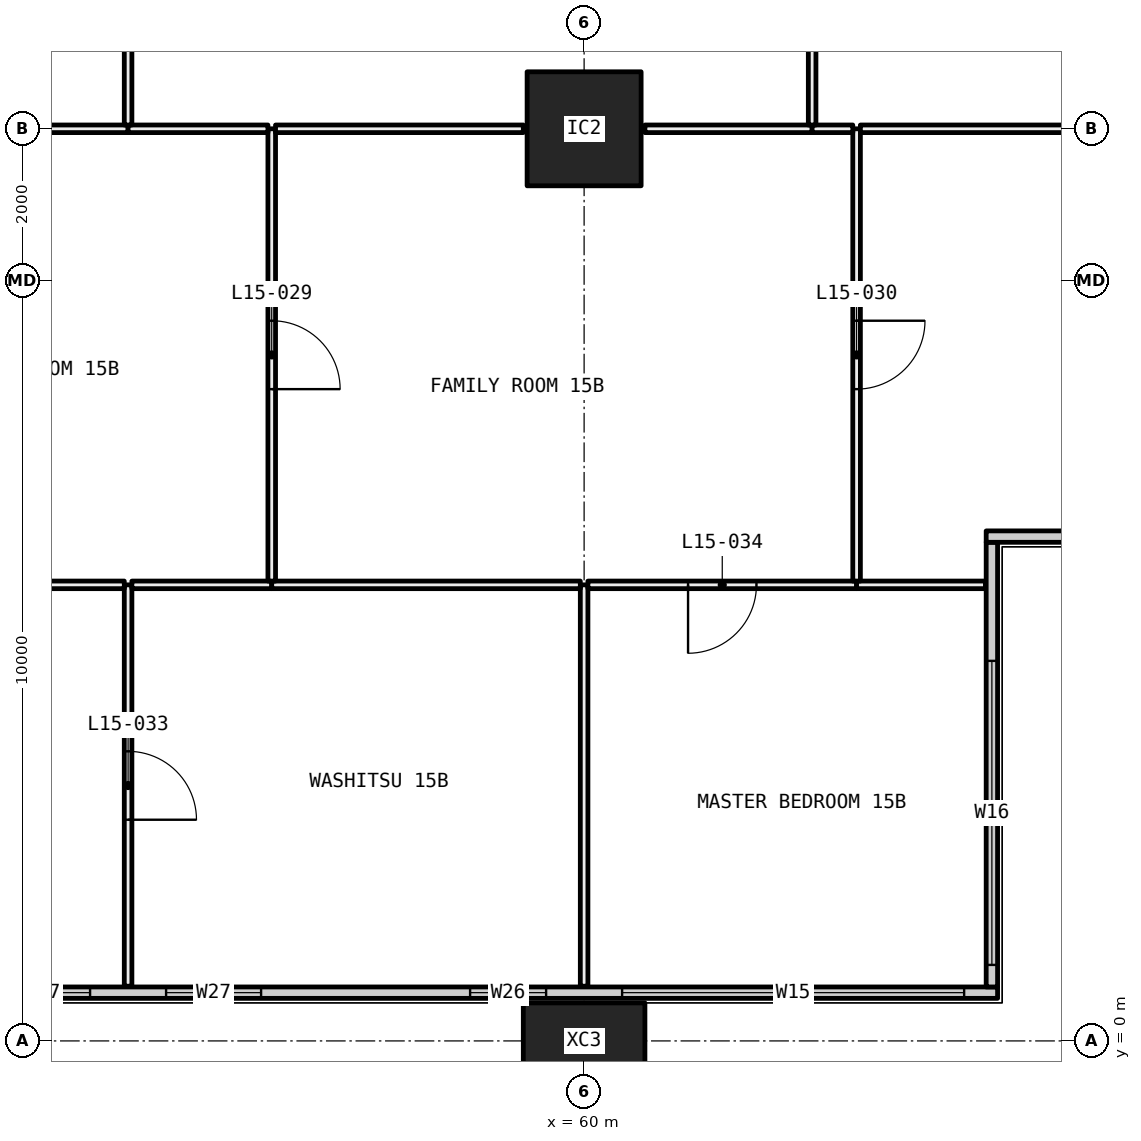
"""IFC4 building model, lengths in metres.
Left out: names, types, materials, properties, quantities, classifications, styles, units other than length and angle.
Written with IfcOpenShell. Run it as: python <this file> out.ifc"""

import sys

from ifc_helpers import new_model, si_unit, direction, frame, frame_2d, origin, origin_2d, place, context, subcontext, project, spatial, rectangle, hollow_rectangle, extrude, element, fill, save


model = new_model("IFC4")
c1 = context("Model", 3, precision=1e-05, world=origin(), true_north=direction((0.0, 1.0)))
c2 = subcontext(c1, "Body", "Model", "MODEL_VIEW")
j1 = project(units=[si_unit("LENGTHUNIT", "METRE"), si_unit("PLANEANGLEUNIT", "RADIAN")], contexts=[c1])
p1 = place(None, origin())
s1 = spatial("IfcSite", under=j1, at=p1, CompositionType="ELEMENT")
p2 = place(p1, origin())
s2 = spatial("IfcBuilding", under=s1, at=p2, CompositionType="ELEMENT")
p3 = place(p2, frame((0.0, 0.0, 64.5)))
s3 = spatial("IfcBuildingStorey", under=s2, at=p3, CompositionType="ELEMENT", Elevation=64.5)
p4 = place(p3, frame((60.0, 0.0, -0.4), z_axis=(0.0, 0.0, 1.0), x_axis=(1.0, 0.0, 0.0)))
e1 = element("IfcColumn", 1, at=p4, inside=s3, PredefinedType="COLUMN", context=c2, shape_type="SweptSolid", body=[
    extrude(hollow_rectangle(XDim=1.6, YDim=1.0, WallThickness=0.065, at=origin_2d()), origin(), (0.0, 0.0, 1.0), 3.45),
])
p5 = place(p3, frame((60.0, 12.0, 0.0), z_axis=(0.0, 0.0, 1.0), x_axis=(1.0, 0.0, 0.0)))
e2 = element("IfcColumn", 2, at=p5, inside=s3, PredefinedType="COLUMN", context=c2, shape_type="SweptSolid", body=[
    extrude(hollow_rectangle(XDim=1.5, YDim=1.5, WallThickness=0.065, at=origin_2d()), origin(), (0.0, 0.0, 1.0), 3.05),
])
p6 = place(p3, frame((6.56, 0.635, 0.0), z_axis=(0.0, 0.0, 1.0), x_axis=(1.0, 0.0, 0.0)))
e3 = element("IfcWall", 3, at=p6, inside=s3, PredefinedType="ELEMENTEDWALL", context=c2, shape_type="SweptSolid", body=[
    extrude(rectangle(XDim=58.88, YDim=0.15, at=frame_2d((29.44, 0.0))), origin(), (0.0, 0.0, 1.0), 3.05),
])
p7 = place(p6, frame((0.44, 0.0, 0.45)))
e4 = element("IfcOpeningElement", 4, at=p7, cuts=e3, PredefinedType="OPENING", context=c2, shape_type="SweptSolid", body=[
    extrude(rectangle(XDim=4.5, YDim=2.55, at=frame_2d((2.25, 1.275))), frame((0.0, 0.085, 0.0), z_axis=(0.0, -1.0, 0.0), x_axis=(1.0, 0.0, 0.0)), (0.0, 0.0, 1.0), 0.17),
])
p8 = place(p6, frame((5.94, 0.0, 0.45)))
e5 = element("IfcOpeningElement", 5, at=p8, cuts=e3, PredefinedType="OPENING", context=c2, shape_type="SweptSolid", body=[
    extrude(rectangle(XDim=1.0, YDim=2.55, at=frame_2d((0.5, 1.275))), frame((0.0, 0.085, 0.0), z_axis=(0.0, -1.0, 0.0), x_axis=(1.0, 0.0, 0.0)), (0.0, 0.0, 1.0), 0.17),
])
p9 = place(p6, frame((9.69, 0.0, 0.45)))
e6 = element("IfcOpeningElement", 6, at=p9, cuts=e3, PredefinedType="OPENING", context=c2, shape_type="SweptSolid", body=[
    extrude(rectangle(XDim=1.25, YDim=2.55, at=frame_2d((0.625, 1.275))), frame((0.0, 0.085, 0.0), z_axis=(0.0, -1.0, 0.0), x_axis=(1.0, 0.0, 0.0)), (0.0, 0.0, 1.0), 0.17),
])
p10 = place(p6, frame((11.94, 0.0, 0.45)))
e7 = element("IfcOpeningElement", 7, at=p10, cuts=e3, PredefinedType="OPENING", context=c2, shape_type="SweptSolid", body=[
    extrude(rectangle(XDim=1.25, YDim=2.55, at=frame_2d((0.625, 1.275))), frame((0.0, 0.085, 0.0), z_axis=(0.0, -1.0, 0.0), x_axis=(1.0, 0.0, 0.0)), (0.0, 0.0, 1.0), 0.17),
])
p11 = place(p6, frame((15.94, 0.0, 0.45)))
e8 = element("IfcOpeningElement", 8, at=p11, cuts=e3, PredefinedType="OPENING", context=c2, shape_type="SweptSolid", body=[
    extrude(rectangle(XDim=1.0, YDim=2.55, at=frame_2d((0.5, 1.275))), frame((0.0, 0.085, 0.0), z_axis=(0.0, -1.0, 0.0), x_axis=(1.0, 0.0, 0.0)), (0.0, 0.0, 1.0), 0.17),
])
p12 = place(p6, frame((17.94, 0.0, 0.45)))
e9 = element("IfcOpeningElement", 9, at=p12, cuts=e3, PredefinedType="OPENING", context=c2, shape_type="SweptSolid", body=[
    extrude(rectangle(XDim=1.0, YDim=2.55, at=frame_2d((0.5, 1.275))), frame((0.0, 0.085, 0.0), z_axis=(0.0, -1.0, 0.0), x_axis=(1.0, 0.0, 0.0)), (0.0, 0.0, 1.0), 0.17),
])
p13 = place(p6, frame((21.69, 0.0, 0.45)))
e10 = element("IfcOpeningElement", 10, at=p13, cuts=e3, PredefinedType="OPENING", context=c2, shape_type="SweptSolid", body=[
    extrude(rectangle(XDim=1.25, YDim=2.55, at=frame_2d((0.625, 1.275))), frame((0.0, 0.085, 0.0), z_axis=(0.0, -1.0, 0.0), x_axis=(1.0, 0.0, 0.0)), (0.0, 0.0, 1.0), 0.17),
])
p14 = place(p6, frame((23.94, 0.0, 0.45)))
e11 = element("IfcOpeningElement", 11, at=p14, cuts=e3, PredefinedType="OPENING", context=c2, shape_type="SweptSolid", body=[
    extrude(rectangle(XDim=1.25, YDim=2.55, at=frame_2d((0.625, 1.275))), frame((0.0, 0.085, 0.0), z_axis=(0.0, -1.0, 0.0), x_axis=(1.0, 0.0, 0.0)), (0.0, 0.0, 1.0), 0.17),
])
p15 = place(p6, frame((27.94, 0.0, 0.45)))
e12 = element("IfcOpeningElement", 12, at=p15, cuts=e3, PredefinedType="OPENING", context=c2, shape_type="SweptSolid", body=[
    extrude(rectangle(XDim=1.0, YDim=2.55, at=frame_2d((0.5, 1.275))), frame((0.0, 0.085, 0.0), z_axis=(0.0, -1.0, 0.0), x_axis=(1.0, 0.0, 0.0)), (0.0, 0.0, 1.0), 0.17),
])
p16 = place(p6, frame((29.94, 0.0, 0.45)))
e13 = element("IfcOpeningElement", 13, at=p16, cuts=e3, PredefinedType="OPENING", context=c2, shape_type="SweptSolid", body=[
    extrude(rectangle(XDim=1.0, YDim=2.55, at=frame_2d((0.5, 1.275))), frame((0.0, 0.085, 0.0), z_axis=(0.0, -1.0, 0.0), x_axis=(1.0, 0.0, 0.0)), (0.0, 0.0, 1.0), 0.17),
])
p17 = place(p6, frame((33.69, 0.0, 0.45)))
e14 = element("IfcOpeningElement", 14, at=p17, cuts=e3, PredefinedType="OPENING", context=c2, shape_type="SweptSolid", body=[
    extrude(rectangle(XDim=1.25, YDim=2.55, at=frame_2d((0.625, 1.275))), frame((0.0, 0.085, 0.0), z_axis=(0.0, -1.0, 0.0), x_axis=(1.0, 0.0, 0.0)), (0.0, 0.0, 1.0), 0.17),
])
p18 = place(p6, frame((35.94, 0.0, 0.45)))
e15 = element("IfcOpeningElement", 15, at=p18, cuts=e3, PredefinedType="OPENING", context=c2, shape_type="SweptSolid", body=[
    extrude(rectangle(XDim=1.25, YDim=2.55, at=frame_2d((0.625, 1.275))), frame((0.0, 0.085, 0.0), z_axis=(0.0, -1.0, 0.0), x_axis=(1.0, 0.0, 0.0)), (0.0, 0.0, 1.0), 0.17),
])
p19 = place(p6, frame((39.94, 0.0, 0.45)))
e16 = element("IfcOpeningElement", 16, at=p19, cuts=e3, PredefinedType="OPENING", context=c2, shape_type="SweptSolid", body=[
    extrude(rectangle(XDim=1.0, YDim=2.55, at=frame_2d((0.5, 1.275))), frame((0.0, 0.085, 0.0), z_axis=(0.0, -1.0, 0.0), x_axis=(1.0, 0.0, 0.0)), (0.0, 0.0, 1.0), 0.17),
])
p20 = place(p6, frame((41.94, 0.0, 0.45)))
e17 = element("IfcOpeningElement", 17, at=p20, cuts=e3, PredefinedType="OPENING", context=c2, shape_type="SweptSolid", body=[
    extrude(rectangle(XDim=1.0, YDim=2.55, at=frame_2d((0.5, 1.275))), frame((0.0, 0.085, 0.0), z_axis=(0.0, -1.0, 0.0), x_axis=(1.0, 0.0, 0.0)), (0.0, 0.0, 1.0), 0.17),
])
p21 = place(p6, frame((45.69, 0.0, 0.45)))
e18 = element("IfcOpeningElement", 18, at=p21, cuts=e3, PredefinedType="OPENING", context=c2, shape_type="SweptSolid", body=[
    extrude(rectangle(XDim=1.25, YDim=2.55, at=frame_2d((0.625, 1.275))), frame((0.0, 0.085, 0.0), z_axis=(0.0, -1.0, 0.0), x_axis=(1.0, 0.0, 0.0)), (0.0, 0.0, 1.0), 0.17),
])
p22 = place(p6, frame((47.94, 0.0, 0.45)))
e19 = element("IfcOpeningElement", 19, at=p22, cuts=e3, PredefinedType="OPENING", context=c2, shape_type="SweptSolid", body=[
    extrude(rectangle(XDim=1.25, YDim=2.55, at=frame_2d((0.625, 1.275))), frame((0.0, 0.085, 0.0), z_axis=(0.0, -1.0, 0.0), x_axis=(1.0, 0.0, 0.0)), (0.0, 0.0, 1.0), 0.17),
])
p23 = place(p6, frame((51.94, 0.0, 0.45)))
e20 = element("IfcOpeningElement", 20, at=p23, cuts=e3, PredefinedType="OPENING", context=c2, shape_type="SweptSolid", body=[
    extrude(rectangle(XDim=1.0, YDim=2.55, at=frame_2d((0.5, 1.275))), frame((0.0, 0.085, 0.0), z_axis=(0.0, -1.0, 0.0), x_axis=(1.0, 0.0, 0.0)), (0.0, 0.0, 1.0), 0.17),
])
p24 = place(p6, frame((53.94, 0.0, 0.45)))
e21 = element("IfcOpeningElement", 21, at=p24, cuts=e3, PredefinedType="OPENING", context=c2, shape_type="SweptSolid", body=[
    extrude(rectangle(XDim=4.5, YDim=2.55, at=frame_2d((2.25, 1.275))), frame((0.0, 0.085, 0.0), z_axis=(0.0, -1.0, 0.0), x_axis=(1.0, 0.0, 0.0)), (0.0, 0.0, 1.0), 0.17),
])
p25 = place(p3, frame((65.365, 0.71, 0.0), z_axis=(0.0, 0.0, 1.0), x_axis=(0.0, 1.0, 0.0)))
e22 = element("IfcWall", 22, at=p25, inside=s3, PredefinedType="ELEMENTEDWALL", context=c2, shape_type="SweptSolid", body=[
    extrude(rectangle(XDim=5.85, YDim=0.15, at=frame_2d((2.925, 0.0))), origin(), (0.0, 0.0, 1.0), 3.05),
])
p26 = place(p25, frame((0.29, 0.0, 0.45)))
e23 = element("IfcOpeningElement", 23, at=p26, cuts=e22, PredefinedType="OPENING", context=c2, shape_type="SweptSolid", body=[
    extrude(rectangle(XDim=4.0, YDim=2.55, at=frame_2d((2.0, 1.275))), frame((0.0, 0.085, 0.0), z_axis=(0.0, -1.0, 0.0), x_axis=(1.0, 0.0, 0.0)), (0.0, 0.0, 1.0), 0.17),
])
p27 = place(p3, frame((65.29, 6.635, 0.0), z_axis=(0.0, 0.0, 1.0), x_axis=(1.0, 0.0, 0.0)))
e24 = element("IfcWall", 24, at=p27, inside=s3, PredefinedType="ELEMENTEDWALL", context=c2, shape_type="SweptSolid", body=[
    extrude(rectangle(XDim=6.15, YDim=0.15, at=frame_2d((3.075, 0.0))), origin(), (0.0, 0.0, 1.0), 3.05),
])
p28 = place(p27, frame((1.71, 0.0, 0.45)))
e25 = element("IfcOpeningElement", 25, at=p28, cuts=e24, PredefinedType="OPENING", context=c2, shape_type="SweptSolid", body=[
    extrude(rectangle(XDim=4.0, YDim=2.55, at=frame_2d((2.0, 1.275))), frame((0.0, 0.085, 0.0), z_axis=(0.0, -1.0, 0.0), x_axis=(1.0, 0.0, 0.0)), (0.0, 0.0, 1.0), 0.17),
])
p29 = place(p3, frame((54.0, 0.72, 0.0), z_axis=(0.0, 0.0, 1.0), x_axis=(0.0, 1.0, 0.0)))
e26 = element("IfcWall", 26, at=p29, inside=s3, PredefinedType="PARTITIONING", context=c2, shape_type="SweptSolid", body=[
    extrude(rectangle(XDim=5.28, YDim=0.1, at=frame_2d((2.64, 0.0))), origin(), (0.0, 0.0, 1.0), 3.05),
])
p30 = place(p29, frame((2.19, 0.0, 0.0)))
e27 = element("IfcOpeningElement", 27, at=p30, cuts=e26, PredefinedType="OPENING", context=c2, shape_type="SweptSolid", body=[
    extrude(rectangle(XDim=0.9, YDim=2.1, at=frame_2d((0.45, 1.05))), frame((0.0, 0.06, 0.0), z_axis=(0.0, -1.0, 0.0), x_axis=(1.0, 0.0, 0.0)), (0.0, 0.0, 1.0), 0.12),
])
p31 = place(p3, frame((53.95, 6.0, 0.0), z_axis=(0.0, 0.0, 1.0), x_axis=(-1.0, 0.0, 0.0)))
e28 = element("IfcWall", 28, at=p31, inside=s3, PredefinedType="PARTITIONING", context=c2, shape_type="SweptSolid", body=[
    extrude(rectangle(XDim=5.755, YDim=0.1, at=frame_2d((2.877, 0.0))), origin(), (0.0, 0.0, 1.0), 3.05),
])
p32 = place(p31, frame((2.427, 0.0, 0.0)))
e29 = element("IfcOpeningElement", 29, at=p32, cuts=e28, PredefinedType="OPENING", context=c2, shape_type="SweptSolid", body=[
    extrude(rectangle(XDim=0.9, YDim=2.1, at=frame_2d((0.45, 1.05))), frame((0.0, 0.06, 0.0), z_axis=(0.0, -1.0, 0.0), x_axis=(1.0, 0.0, 0.0)), (0.0, 0.0, 1.0), 0.12),
])
p33 = place(p3, frame((60.0, 0.72, 0.0), z_axis=(0.0, 0.0, 1.0), x_axis=(0.0, 1.0, 0.0)))
e30 = element("IfcWall", 30, at=p33, inside=s3, PredefinedType="PARTITIONING", context=c2, shape_type="SweptSolid", body=[
    extrude(rectangle(XDim=5.28, YDim=0.1, at=frame_2d((2.64, 0.0))), origin(), (0.0, 0.0, 1.0), 2.45),
])
p34 = place(p3, frame((55.89, 6.0, 0.0), z_axis=(0.0, 0.0, 1.0), x_axis=(-1.0, 0.0, 0.0)))
e31 = element("IfcWall", 31, at=p34, inside=s3, PredefinedType="PARTITIONING", context=c2, shape_type="SweptSolid", body=[
    extrude(rectangle(XDim=1.84, YDim=0.1, at=frame_2d((0.92, 0.0))), origin(), (0.0, 0.0, 1.0), 3.05),
])
p35 = place(p3, frame((59.95, 6.0, 0.0), z_axis=(0.0, 0.0, 1.0), x_axis=(-1.0, 0.0, 0.0)))
e32 = element("IfcWall", 32, at=p35, inside=s3, PredefinedType="PARTITIONING", context=c2, shape_type="SweptSolid", body=[
    extrude(rectangle(XDim=4.06, YDim=0.1, at=frame_2d((2.03, 0.0))), origin(), (0.0, 0.0, 1.0), 2.45),
])
p36 = place(p3, frame((63.585, 6.0, 0.0), z_axis=(0.0, 0.0, 1.0), x_axis=(-1.0, 0.0, 0.0)))
e33 = element("IfcWall", 33, at=p36, inside=s3, PredefinedType="PARTITIONING", context=c2, shape_type="SweptSolid", body=[
    extrude(rectangle(XDim=3.535, YDim=0.1, at=frame_2d((1.768, 0.0))), origin(), (0.0, 0.0, 1.0), 2.45),
])
p37 = place(p36, frame((1.317, 0.0, 0.0)))
e34 = element("IfcOpeningElement", 34, at=p37, cuts=e33, PredefinedType="OPENING", context=c2, shape_type="SweptSolid", body=[
    extrude(rectangle(XDim=0.9, YDim=2.1, at=frame_2d((0.45, 1.05))), frame((0.0, 0.06, 0.0), z_axis=(0.0, -1.0, 0.0), x_axis=(1.0, 0.0, 0.0)), (0.0, 0.0, 1.0), 0.12),
])
p38 = place(p3, frame((65.28, 6.0, 0.0), z_axis=(0.0, 0.0, 1.0), x_axis=(-1.0, 0.0, 0.0)))
e35 = element("IfcWall", 35, at=p38, inside=s3, PredefinedType="PARTITIONING", context=c2, shape_type="SweptSolid", body=[
    extrude(rectangle(XDim=1.695, YDim=0.1, at=frame_2d((0.848, 0.0))), origin(), (0.0, 0.0, 1.0), 3.05),
])
p39 = place(p3, frame((55.89, 6.05, 0.0), z_axis=(0.0, 0.0, 1.0), x_axis=(0.0, 1.0, 0.0)))
e36 = element("IfcWall", 36, at=p39, inside=s3, PredefinedType="PARTITIONING", context=c2, shape_type="SweptSolid", body=[
    extrude(rectangle(XDim=5.95, YDim=0.1, at=frame_2d((2.975, 0.0))), origin(), (0.0, 0.0, 1.0), 2.45),
])
p40 = place(p39, frame((2.525, 0.0, 0.0)))
e37 = element("IfcOpeningElement", 37, at=p40, cuts=e36, PredefinedType="OPENING", context=c2, shape_type="SweptSolid", body=[
    extrude(rectangle(XDim=0.9, YDim=2.1, at=frame_2d((0.45, 1.05))), frame((0.0, 0.06, 0.0), z_axis=(0.0, -1.0, 0.0), x_axis=(1.0, 0.0, 0.0)), (0.0, 0.0, 1.0), 0.12),
])
p41 = place(p3, frame((54.0, 12.0, 0.0), z_axis=(0.0, 0.0, 1.0), x_axis=(-1.0, 0.0, 0.0)))
e38 = element("IfcWall", 38, at=p41, inside=s3, PredefinedType="PARTITIONING", context=c2, shape_type="SweptSolid", body=[
    extrude(rectangle(XDim=4.5, YDim=0.1, at=frame_2d((2.25, 0.0))), origin(), (0.0, 0.0, 1.0), 2.45),
])
p42 = place(p41, frame((1.8, 0.0, 0.0)))
e39 = element("IfcOpeningElement", 39, at=p42, cuts=e38, PredefinedType="OPENING", context=c2, shape_type="SweptSolid", body=[
    extrude(rectangle(XDim=0.9, YDim=2.1, at=frame_2d((0.45, 1.05))), frame((0.0, 0.06, 0.0), z_axis=(0.0, -1.0, 0.0), x_axis=(1.0, 0.0, 0.0)), (0.0, 0.0, 1.0), 0.12),
])
p43 = place(p3, frame((55.84, 12.0, 0.0), z_axis=(0.0, 0.0, 1.0), x_axis=(-1.0, 0.0, 0.0)))
e40 = element("IfcWall", 40, at=p43, inside=s3, PredefinedType="PARTITIONING", context=c2, shape_type="SweptSolid", body=[
    extrude(rectangle(XDim=1.84, YDim=0.1, at=frame_2d((0.92, 0.0))), origin(), (0.0, 0.0, 1.0), 2.45),
])
p44 = place(p3, frame((63.585, 6.05, 0.0), z_axis=(0.0, 0.0, 1.0), x_axis=(0.0, 1.0, 0.0)))
e41 = element("IfcWall", 41, at=p44, inside=s3, PredefinedType="PARTITIONING", context=c2, shape_type="SweptSolid", body=[
    extrude(rectangle(XDim=5.95, YDim=0.1, at=frame_2d((2.975, 0.0))), origin(), (0.0, 0.0, 1.0), 2.45),
])
p45 = place(p44, frame((2.525, 0.0, 0.0)))
e42 = element("IfcOpeningElement", 42, at=p45, cuts=e41, PredefinedType="OPENING", context=c2, shape_type="SweptSolid", body=[
    extrude(rectangle(XDim=0.9, YDim=2.1, at=frame_2d((0.45, 1.05))), frame((0.0, 0.06, 0.0), z_axis=(0.0, -1.0, 0.0), x_axis=(1.0, 0.0, 0.0)), (0.0, 0.0, 1.0), 0.12),
])
p46 = place(p3, frame((59.2, 12.0, 0.0), z_axis=(0.0, 0.0, 1.0), x_axis=(-1.0, 0.0, 0.0)))
e43 = element("IfcWall", 43, at=p46, inside=s3, PredefinedType="PARTITIONING", context=c2, shape_type="SweptSolid", body=[
    extrude(rectangle(XDim=3.26, YDim=0.1, at=frame_2d((1.63, 0.0))), origin(), (0.0, 0.0, 1.0), 2.45),
])
p47 = place(p3, frame((63.0, 12.0, 0.0), z_axis=(0.0, 0.0, 1.0), x_axis=(-1.0, 0.0, 0.0)))
e44 = element("IfcWall", 44, at=p47, inside=s3, PredefinedType="PARTITIONING", context=c2, shape_type="SweptSolid", body=[
    extrude(rectangle(XDim=2.2, YDim=0.1, at=frame_2d((1.1, 0.0))), origin(), (0.0, 0.0, 1.0), 2.45),
])
p48 = place(p3, frame((63.535, 12.0, 0.0), z_axis=(0.0, 0.0, 1.0), x_axis=(-1.0, 0.0, 0.0)))
e45 = element("IfcWall", 45, at=p48, inside=s3, PredefinedType="PARTITIONING", context=c2, shape_type="SweptSolid", body=[
    extrude(rectangle(XDim=0.535, YDim=0.1, at=frame_2d((0.268, 0.0))), origin(), (0.0, 0.0, 1.0), 2.45),
])
p49 = place(p3, frame((71.28, 12.0, 0.0), z_axis=(0.0, 0.0, 1.0), x_axis=(-1.0, 0.0, 0.0)))
e46 = element("IfcWall", 46, at=p49, inside=s3, PredefinedType="PARTITIONING", context=c2, shape_type="SweptSolid", body=[
    extrude(rectangle(XDim=7.645, YDim=0.1, at=frame_2d((3.823, 0.0))), origin(), (0.0, 0.0, 1.0), 2.45),
])
p50 = place(p49, frame((3.373, 0.0, 0.0)))
e47 = element("IfcOpeningElement", 47, at=p50, cuts=e46, PredefinedType="OPENING", context=c2, shape_type="SweptSolid", body=[
    extrude(rectangle(XDim=0.9, YDim=2.1, at=frame_2d((0.45, 1.05))), frame((0.0, 0.06, 0.0), z_axis=(0.0, -1.0, 0.0), x_axis=(1.0, 0.0, 0.0)), (0.0, 0.0, 1.0), 0.12),
])
p51 = place(p3, frame((54.0, 12.05, 0.0), z_axis=(0.0, 0.0, 1.0), x_axis=(0.0, 1.0, 0.0)))
e48 = element("IfcWall", 48, at=p51, inside=s3, PredefinedType="PARTITIONING", context=c2, shape_type="SweptSolid", body=[
    extrude(rectangle(XDim=5.85, YDim=0.1, at=frame_2d((2.925, 0.0))), origin(), (0.0, 0.0, 1.0), 2.45),
])
p52 = place(p51, frame((2.475, 0.0, 0.0)))
e49 = element("IfcOpeningElement", 49, at=p52, cuts=e48, PredefinedType="OPENING", context=c2, shape_type="SweptSolid", body=[
    extrude(rectangle(XDim=0.9, YDim=2.1, at=frame_2d((0.45, 1.05))), frame((0.0, 0.06, 0.0), z_axis=(0.0, -1.0, 0.0), x_axis=(1.0, 0.0, 0.0)), (0.0, 0.0, 1.0), 0.12),
])
p53 = place(p3, frame((63.0, 12.05, 0.0), z_axis=(0.0, 0.0, 1.0), x_axis=(0.0, 1.0, 0.0)))
e50 = element("IfcWall", 50, at=p53, inside=s3, PredefinedType="PARTITIONING", context=c2, shape_type="SweptSolid", body=[
    extrude(rectangle(XDim=5.85, YDim=0.1, at=frame_2d((2.925, 0.0))), origin(), (0.0, 0.0, 1.0), 2.45),
])
p54 = place(p21, origin())
e51 = element("IfcWindow", 51, at=p54, inside=s3, PartitioningType="SINGLE_PANEL", PredefinedType="WINDOW", context=c2, shape_type="SweptSolid", body=[
    extrude(rectangle(XDim=1.25, YDim=2.55, at=frame_2d((0.625, 1.275))), frame((0.0, 0.03, 0.0), z_axis=(0.0, -1.0, 0.0), x_axis=(1.0, 0.0, 0.0)), (0.0, 0.0, 1.0), 0.06),
])
fill(e18, e51)
p55 = place(p22, origin())
e52 = element("IfcWindow", 52, at=p55, inside=s3, PartitioningType="SINGLE_PANEL", PredefinedType="WINDOW", context=c2, shape_type="SweptSolid", body=[
    extrude(rectangle(XDim=1.25, YDim=2.55, at=frame_2d((0.625, 1.275))), frame((0.0, 0.03, 0.0), z_axis=(0.0, -1.0, 0.0), x_axis=(1.0, 0.0, 0.0)), (0.0, 0.0, 1.0), 0.06),
])
fill(e19, e52)
p56 = place(p23, origin())
e53 = element("IfcWindow", 53, at=p56, inside=s3, PartitioningType="SINGLE_PANEL", PredefinedType="WINDOW", context=c2, shape_type="SweptSolid", body=[
    extrude(rectangle(XDim=1.0, YDim=2.55, at=frame_2d((0.5, 1.275))), frame((0.0, 0.03, 0.0), z_axis=(0.0, -1.0, 0.0), x_axis=(1.0, 0.0, 0.0)), (0.0, 0.0, 1.0), 0.06),
])
fill(e20, e53)
p57 = place(p24, origin())
e54 = element("IfcWindow", 54, at=p57, inside=s3, PartitioningType="SINGLE_PANEL", PredefinedType="WINDOW", context=c2, shape_type="SweptSolid", body=[
    extrude(rectangle(XDim=4.5, YDim=2.55, at=frame_2d((2.25, 1.275))), frame((0.0, 0.03, 0.0), z_axis=(0.0, -1.0, 0.0), x_axis=(1.0, 0.0, 0.0)), (0.0, 0.0, 1.0), 0.06),
])
fill(e21, e54)
p58 = place(p26, origin())
e55 = element("IfcWindow", 55, at=p58, inside=s3, PartitioningType="SINGLE_PANEL", PredefinedType="WINDOW", context=c2, shape_type="SweptSolid", body=[
    extrude(rectangle(XDim=4.0, YDim=2.55, at=frame_2d((2.0, 1.275))), frame((0.0, 0.03, 0.0), z_axis=(0.0, -1.0, 0.0), x_axis=(1.0, 0.0, 0.0)), (0.0, 0.0, 1.0), 0.06),
])
fill(e23, e55)
p59 = place(p40, frame((0.9, 0.0, 0.0), x_axis=(-1.0, 0.0, 0.0)))
e56 = element("IfcDoor", 56, at=p59, inside=s3, OperationType="SINGLE_SWING_LEFT", PredefinedType="DOOR", context=c2, shape_type="SweptSolid", body=[
    extrude(rectangle(XDim=0.9, YDim=2.1, at=frame_2d((0.45, 1.05))), frame((0.0, 0.025, 0.0), z_axis=(0.0, -1.0, 0.0), x_axis=(1.0, 0.0, 0.0)), (0.0, 0.0, 1.0), 0.05),
])
fill(e37, e56)
p60 = place(p45, frame((0.9, 0.0, 0.0), x_axis=(-1.0, 0.0, 0.0)))
e57 = element("IfcDoor", 57, at=p60, inside=s3, OperationType="SINGLE_SWING_RIGHT", PredefinedType="DOOR", context=c2, shape_type="SweptSolid", body=[
    extrude(rectangle(XDim=0.9, YDim=2.1, at=frame_2d((0.45, 1.05))), frame((0.0, 0.025, 0.0), z_axis=(0.0, -1.0, 0.0), x_axis=(1.0, 0.0, 0.0)), (0.0, 0.0, 1.0), 0.05),
])
fill(e42, e57)
p61 = place(p30, frame((0.9, 0.0, 0.0), x_axis=(-1.0, 0.0, 0.0)))
e58 = element("IfcDoor", 58, at=p61, inside=s3, OperationType="SINGLE_SWING_LEFT", PredefinedType="DOOR", context=c2, shape_type="SweptSolid", body=[
    extrude(rectangle(XDim=0.9, YDim=2.1, at=frame_2d((0.45, 1.05))), frame((0.0, 0.025, 0.0), z_axis=(0.0, -1.0, 0.0), x_axis=(1.0, 0.0, 0.0)), (0.0, 0.0, 1.0), 0.05),
])
fill(e27, e58)
p62 = place(p37, origin())
e59 = element("IfcDoor", 59, at=p62, inside=s3, OperationType="SINGLE_SWING_LEFT", PredefinedType="DOOR", context=c2, shape_type="SweptSolid", body=[
    extrude(rectangle(XDim=0.9, YDim=2.1, at=frame_2d((0.45, 1.05))), frame((0.0, 0.025, 0.0), z_axis=(0.0, -1.0, 0.0), x_axis=(1.0, 0.0, 0.0)), (0.0, 0.0, 1.0), 0.05),
])
fill(e34, e59)
save(model, sys.argv[1])
